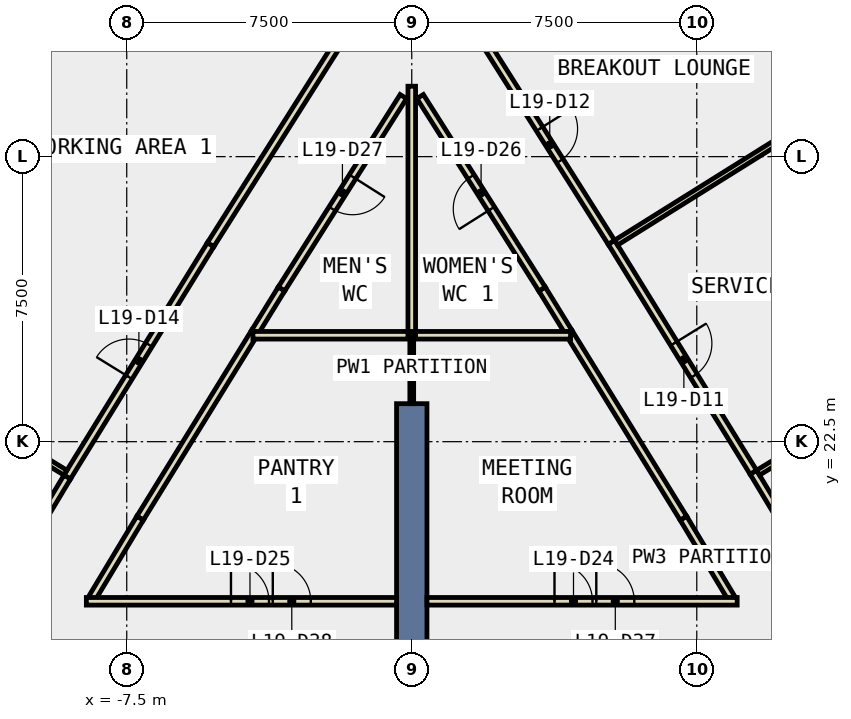
"""IFC4 building model, lengths in metres.
Left out: names, types, materials, properties, quantities, classifications, styles, units other than length and angle.
Written with IfcOpenShell. Run it as: python <this file> out.ifc"""

import sys

from ifc_helpers import new_model, si_unit, direction, frame, frame_2d, origin, place, context, subcontext, project, spatial, rectangle, extrude, element, fill, save


model = new_model("IFC4")
c1 = context("Model", 3, precision=1e-05, world=origin(), true_north=direction((0.0, 1.0)))
c2 = subcontext(c1, "Body", "Model", "MODEL_VIEW")
j1 = project(units=[si_unit("LENGTHUNIT", "METRE"), si_unit("PLANEANGLEUNIT", "RADIAN")], contexts=[c1])
p1 = place(None, origin())
s1 = spatial("IfcSite", under=j1, at=p1, CompositionType="ELEMENT")
p2 = place(p1, origin())
s2 = spatial("IfcBuilding", under=s1, at=p2, CompositionType="ELEMENT")
p3 = place(p2, frame((0.0, 0.0, 90.8)))
s3 = spatial("IfcBuildingStorey", under=s2, at=p3, CompositionType="ELEMENT", Elevation=90.8)
p4 = place(p3, frame((0.0, 14.5, -0.4), z_axis=(0.0, 0.0, 1.0), x_axis=(0.0, 1.0, 0.0)))
e1 = element("IfcWall", 1, at=p4, inside=s3, PredefinedType="SHEAR", context=c2, shape_type="SweptSolid", body=[
    extrude(rectangle(XDim=9.0, YDim=0.8, at=frame_2d((4.5, 0.0))), origin(), (0.0, 0.0, 1.0), 4.2),
])
p5 = place(p3, frame((11.232, 32.043, 0.0), z_axis=(0.0, 0.0, 1.0), x_axis=(-0.534869492536, 0.84493468739, 0.0)))
e2 = element("IfcWall", 2, at=p5, inside=s3, PredefinedType="STANDARD", context=c2, shape_type="SweptSolid", body=[
    extrude(rectangle(XDim=6.076, YDim=0.3, at=frame_2d((3.038, 0.0))), origin(), (0.0, 0.0, 1.0), 3.8),
])
p6 = place(p5, frame((0.519, 0.0, 0.9)))
e3 = element("IfcOpeningElement", 3, at=p6, cuts=e2, PredefinedType="OPENING", context=c2, shape_type="SweptSolid", body=[
    extrude(rectangle(XDim=2.0, YDim=2.6, at=frame_2d((1.0, 1.3))), frame((0.0, 0.16, 0.0), z_axis=(0.0, -1.0, 0.0), x_axis=(1.0, 0.0, 0.0)), (0.0, 0.0, 1.0), 0.32),
])
p7 = place(p5, frame((3.557, 0.0, 0.9)))
e4 = element("IfcOpeningElement", 4, at=p7, cuts=e2, PredefinedType="OPENING", context=c2, shape_type="SweptSolid", body=[
    extrude(rectangle(XDim=2.0, YDim=2.6, at=frame_2d((1.0, 1.3))), frame((0.0, 0.16, 0.0), z_axis=(0.0, -1.0, 0.0), x_axis=(1.0, 0.0, 0.0)), (0.0, 0.0, 1.0), 0.32),
])
p8 = place(p3, frame((-7.982, 37.177, 0.0), z_axis=(0.0, 0.0, 1.0), x_axis=(-0.534869492536, -0.84493468739, 0.0)))
e5 = element("IfcWall", 5, at=p8, inside=s3, PredefinedType="STANDARD", context=c2, shape_type="SweptSolid", body=[
    extrude(rectangle(XDim=6.076, YDim=0.3, at=frame_2d((3.038, 0.0))), origin(), (0.0, 0.0, 1.0), 3.8),
])
p9 = place(p8, frame((0.519, 0.0, 0.9)))
e6 = element("IfcOpeningElement", 6, at=p9, cuts=e5, PredefinedType="OPENING", context=c2, shape_type="SweptSolid", body=[
    extrude(rectangle(XDim=2.0, YDim=2.6, at=frame_2d((1.0, 1.3))), frame((0.0, 0.16, 0.0), z_axis=(0.0, -1.0, 0.0), x_axis=(1.0, 0.0, 0.0)), (0.0, 0.0, 1.0), 0.32),
])
p10 = place(p8, frame((3.557, 0.0, 0.9)))
e7 = element("IfcOpeningElement", 7, at=p10, cuts=e5, PredefinedType="OPENING", context=c2, shape_type="SweptSolid", body=[
    extrude(rectangle(XDim=2.0, YDim=2.6, at=frame_2d((1.0, 1.3))), frame((0.0, 0.16, 0.0), z_axis=(0.0, -1.0, 0.0), x_axis=(1.0, 0.0, 0.0)), (0.0, 0.0, 1.0), 0.32),
])
p11 = place(p3, frame((8.411, 18.386, 0.0), z_axis=(0.0, 0.0, 1.0), x_axis=(-0.515008089027, 0.857185317325, 0.0)))
e8 = element("IfcWall", 8, at=p11, inside=s3, PredefinedType="PARTITIONING", context=c2, shape_type="SweptSolid", body=[
    extrude(rectangle(XDim=2.452, YDim=0.2, at=frame_2d((1.226, 0.0))), origin(), (0.0, 0.0, 1.0), 3.8),
])
for number, where, z_axis, x_axis in (
    (9, (7.148, 20.488, 0.0), (0.0, 0.0, 1.0), (-0.525, 0.851, 0.0)),
    (10, (-4.126, 25.385, 0.0), (0.0, 0.0, 1.0), (-0.525, -0.851, 0.0)),
):
    element("IfcWall", number, at=place(p3, frame(where, z_axis=z_axis, x_axis=x_axis)), inside=s3, PredefinedType="PARTITIONING", context=c2, shape_type="SweptSolid", body=[
        extrude(rectangle(XDim=5.754, YDim=0.2, at=frame_2d((2.877, 0.0))), origin(), (0.0, 0.0, 1.0), 3.8),
    ])
p12 = place(p3, frame((-7.148, 20.488, 0.0), z_axis=(0.0, 0.0, 1.0), x_axis=(-0.515008089027, -0.857185317325, 0.0)))
e11 = element("IfcWall", 11, at=p12, inside=s3, PredefinedType="PARTITIONING", context=c2, shape_type="SweptSolid", body=[
    extrude(rectangle(XDim=2.452, YDim=0.2, at=frame_2d((1.226, 0.0))), origin(), (0.0, 0.0, 1.0), 3.8),
])
p13 = place(p3, frame((4.126, 25.385, 0.0), z_axis=(0.0, 0.0, 1.0), x_axis=(-0.524824420869, 0.851210507019, 0.0)))
e12 = element("IfcWall", 12, at=p13, inside=s3, PredefinedType="PARTITIONING", context=c2, shape_type="SweptSolid", body=[
    extrude(rectangle(XDim=1.33, YDim=0.2, at=frame_2d((0.665, 0.0))), origin(), (0.0, 0.0, 1.0), 3.8),
])
p14 = place(p3, frame((3.428, 26.517, 0.0), z_axis=(0.0, 0.0, 1.0), x_axis=(-0.535034639024, 0.844830122003, 0.0)))
e13 = element("IfcWall", 13, at=p14, inside=s3, PredefinedType="PARTITIONING", context=c2, shape_type="SweptSolid", body=[
    extrude(rectangle(XDim=5.994, YDim=0.2, at=frame_2d((2.997, 0.0))), origin(), (0.0, 0.0, 1.0), 3.8),
])
p15 = place(p14, frame((2.497, 0.0, 0.0)))
e14 = element("IfcOpeningElement", 14, at=p15, cuts=e13, PredefinedType="OPENING", context=c2, shape_type="SweptSolid", body=[
    extrude(rectangle(XDim=1.0, YDim=2.1, at=frame_2d((0.5, 1.05))), frame((0.0, 0.11, 0.0), z_axis=(0.0, -1.0, 0.0), x_axis=(1.0, 0.0, 0.0)), (0.0, 0.0, 1.0), 0.22),
])
p16 = place(p3, frame((-0.221, 31.581, 0.0), z_axis=(0.0, 0.0, 1.0), x_axis=(-0.535034639024, -0.844830122003, 0.0)))
e15 = element("IfcWall", 15, at=p16, inside=s3, PredefinedType="PARTITIONING", context=c2, shape_type="SweptSolid", body=[
    extrude(rectangle(XDim=5.994, YDim=0.2, at=frame_2d((2.997, 0.0))), origin(), (0.0, 0.0, 1.0), 3.8),
])
p17 = place(p16, frame((2.497, 0.0, 0.0)))
e16 = element("IfcOpeningElement", 16, at=p17, cuts=e15, PredefinedType="OPENING", context=c2, shape_type="SweptSolid", body=[
    extrude(rectangle(XDim=1.0, YDim=2.1, at=frame_2d((0.5, 1.05))), frame((0.0, 0.11, 0.0), z_axis=(0.0, -1.0, 0.0), x_axis=(1.0, 0.0, 0.0)), (0.0, 0.0, 1.0), 0.22),
])
p18 = place(p3, frame((-3.428, 26.517, 0.0), z_axis=(0.0, 0.0, 1.0), x_axis=(-0.524824420869, -0.851210507019, 0.0)))
e17 = element("IfcWall", 17, at=p18, inside=s3, PredefinedType="PARTITIONING", context=c2, shape_type="SweptSolid", body=[
    extrude(rectangle(XDim=1.33, YDim=0.2, at=frame_2d((0.665, 0.0))), origin(), (0.0, 0.0, 1.0), 3.8),
])
p19 = place(p3, frame((8.989, 21.696, 0.0), z_axis=(0.0, 0.0, 1.0), x_axis=(0.515000602442, -0.857189815318, 0.0)))
e18 = element("IfcWall", 18, at=p19, inside=s3, PredefinedType="PARTITIONING", context=c2, shape_type="SweptSolid", body=[
    extrude(rectangle(XDim=7.11, YDim=0.2, at=frame_2d((3.555, 0.0))), origin(), (0.0, 0.0, 1.0), 3.8),
])
p20 = place(p19, frame((3.13, 0.0, 0.0)))
e19 = element("IfcOpeningElement", 19, at=p20, cuts=e18, PredefinedType="OPENING", context=c2, shape_type="SweptSolid", body=[
    extrude(rectangle(XDim=1.0, YDim=2.1, at=frame_2d((0.5, 1.05))), frame((0.0, 0.11, 0.0), z_axis=(0.0, -1.0, 0.0), x_axis=(1.0, 0.0, 0.0)), (0.0, 0.0, 1.0), 0.22),
])
p21 = place(p3, frame((5.254, 27.747, 0.0), z_axis=(0.0, 0.0, 1.0), x_axis=(0.52516023635, -0.851003364363, 0.0)))
e20 = element("IfcWall", 20, at=p21, inside=s3, PredefinedType="PARTITIONING", context=c2, shape_type="SweptSolid", body=[
    extrude(rectangle(XDim=7.11, YDim=0.2, at=frame_2d((3.555, 0.0))), origin(), (0.0, 0.0, 1.0), 3.8),
])
p22 = place(p21, frame((3.13, 0.0, 0.0)))
e21 = element("IfcOpeningElement", 21, at=p22, cuts=e20, PredefinedType="OPENING", context=c2, shape_type="SweptSolid", body=[
    extrude(rectangle(XDim=1.0, YDim=2.1, at=frame_2d((0.5, 1.05))), frame((0.0, 0.11, 0.0), z_axis=(0.0, -1.0, 0.0), x_axis=(1.0, 0.0, 0.0)), (0.0, 0.0, 1.0), 0.22),
])
p23 = place(p3, frame((1.929, 32.997, 0.0), z_axis=(0.0, 0.0, 1.0), x_axis=(0.534863276222, -0.844938622474, 0.0)))
e22 = element("IfcWall", 22, at=p23, inside=s3, PredefinedType="PARTITIONING", context=c2, shape_type="SweptSolid", body=[
    extrude(rectangle(XDim=6.215, YDim=0.2, at=frame_2d((3.107, 0.0))), origin(), (0.0, 0.0, 1.0), 3.8),
])
p24 = place(p23, frame((2.682, 0.0, 0.0)))
e23 = element("IfcOpeningElement", 23, at=p24, cuts=e22, PredefinedType="OPENING", context=c2, shape_type="SweptSolid", body=[
    extrude(rectangle(XDim=1.0, YDim=2.1, at=frame_2d((0.5, 1.05))), frame((0.0, 0.11, 0.0), z_axis=(0.0, -1.0, 0.0), x_axis=(1.0, 0.0, 0.0)), (0.0, 0.0, 1.0), 0.22),
])
p25 = place(p3, frame((-9.067, 21.568, 0.0), z_axis=(0.0, 0.0, 1.0), x_axis=(0.525131931126, 0.851020831068, 0.0)))
e24 = element("IfcWall", 24, at=p25, inside=s3, PredefinedType="PARTITIONING", context=c2, shape_type="SweptSolid", body=[
    extrude(rectangle(XDim=7.187, YDim=0.2, at=frame_2d((3.593, 0.0))), origin(), (0.0, 0.0, 1.0), 3.8),
])
p26 = place(p25, frame((3.093, 0.0, 0.0)))
e25 = element("IfcOpeningElement", 25, at=p26, cuts=e24, PredefinedType="OPENING", context=c2, shape_type="SweptSolid", body=[
    extrude(rectangle(XDim=1.0, YDim=2.1, at=frame_2d((0.5, 1.05))), frame((0.0, 0.11, 0.0), z_axis=(0.0, -1.0, 0.0), x_axis=(1.0, 0.0, 0.0)), (0.0, 0.0, 1.0), 0.22),
])
p27 = place(p3, frame((-5.293, 27.684, 0.0), z_axis=(0.0, 0.0, 1.0), x_axis=(0.534952324147, 0.844882246759, 0.0)))
e26 = element("IfcWall", 26, at=p27, inside=s3, PredefinedType="PARTITIONING", context=c2, shape_type="SweptSolid", body=[
    extrude(rectangle(XDim=6.288, YDim=0.2, at=frame_2d((3.144, 0.0))), origin(), (0.0, 0.0, 1.0), 3.8),
])
p28 = place(p3, frame((-12.728, 15.473, 0.0), z_axis=(0.0, 0.0, 1.0), x_axis=(0.515010673306, 0.857183764651, 0.0)))
e27 = element("IfcWall", 27, at=p28, inside=s3, PredefinedType="PARTITIONING", context=c2, shape_type="SweptSolid", body=[
    extrude(rectangle(XDim=7.111, YDim=0.2, at=frame_2d((3.555, 0.0))), origin(), (0.0, 0.0, 1.0), 3.8),
])
p29 = place(p28, frame((3.13, 0.0, 0.0)))
e28 = element("IfcOpeningElement", 28, at=p29, cuts=e27, PredefinedType="OPENING", context=c2, shape_type="SweptSolid", body=[
    extrude(rectangle(XDim=1.0, YDim=2.1, at=frame_2d((0.5, 1.05))), frame((0.0, 0.11, 0.0), z_axis=(0.0, -1.0, 0.0), x_axis=(1.0, 0.0, 0.0)), (0.0, 0.0, 1.0), 0.22),
])
p30 = place(p3, frame((0.4, 18.3, 0.0), z_axis=(0.0, 0.0, 1.0), x_axis=(1.0, 0.0, 0.0)))
e29 = element("IfcWall", 29, at=p30, inside=s3, PredefinedType="PARTITIONING", context=c2, shape_type="SweptSolid", body=[
    extrude(rectangle(XDim=8.163, YDim=0.2, at=frame_2d((4.082, 0.0))), origin(), (0.0, 0.0, 1.0), 3.8),
])
p31 = place(p30, frame((3.356, 0.0, 0.0)))
e30 = element("IfcOpeningElement", 30, at=p31, cuts=e29, PredefinedType="OPENING", context=c2, shape_type="SweptSolid", body=[
    extrude(rectangle(XDim=1.0, YDim=2.1, at=frame_2d((0.5, 1.05))), frame((0.0, 0.11, 0.0), z_axis=(0.0, -1.0, 0.0), x_axis=(1.0, 0.0, 0.0)), (0.0, 0.0, 1.0), 0.22),
])
p32 = place(p30, frame((4.456, 0.0, 0.0)))
e31 = element("IfcOpeningElement", 31, at=p32, cuts=e29, PredefinedType="OPENING", context=c2, shape_type="SweptSolid", body=[
    extrude(rectangle(XDim=1.0, YDim=2.1, at=frame_2d((0.5, 1.05))), frame((0.0, 0.11, 0.0), z_axis=(0.0, -1.0, 0.0), x_axis=(1.0, 0.0, 0.0)), (0.0, 0.0, 1.0), 0.22),
])
p33 = place(p3, frame((-8.563, 18.3, 0.0), z_axis=(0.0, 0.0, 1.0), x_axis=(1.0, 0.0, 0.0)))
e32 = element("IfcWall", 32, at=p33, inside=s3, PredefinedType="PARTITIONING", context=c2, shape_type="SweptSolid", body=[
    extrude(rectangle(XDim=8.163, YDim=0.2, at=frame_2d((4.082, 0.0))), origin(), (0.0, 0.0, 1.0), 3.8),
])
p34 = place(p33, frame((3.806, 0.0, 0.0)))
e33 = element("IfcOpeningElement", 33, at=p34, cuts=e32, PredefinedType="OPENING", context=c2, shape_type="SweptSolid", body=[
    extrude(rectangle(XDim=1.0, YDim=2.1, at=frame_2d((0.5, 1.05))), frame((0.0, 0.11, 0.0), z_axis=(0.0, -1.0, 0.0), x_axis=(1.0, 0.0, 0.0)), (0.0, 0.0, 1.0), 0.22),
])
p35 = place(p33, frame((4.906, 0.0, 0.0)))
e34 = element("IfcOpeningElement", 34, at=p35, cuts=e32, PredefinedType="OPENING", context=c2, shape_type="SweptSolid", body=[
    extrude(rectangle(XDim=1.0, YDim=2.1, at=frame_2d((0.5, 1.05))), frame((0.0, 0.11, 0.0), z_axis=(0.0, -1.0, 0.0), x_axis=(1.0, 0.0, 0.0)), (0.0, 0.0, 1.0), 0.22),
])
p36 = place(p3, frame((0.0, 23.5, 0.0), z_axis=(0.0, 0.0, 1.0), x_axis=(0.0, 1.0, 0.0)))
e35 = element("IfcWall", 35, at=p36, inside=s3, PredefinedType="PARTITIONING", context=c2, shape_type="SweptSolid", body=[
    extrude(rectangle(XDim=1.9, YDim=0.1, at=frame_2d((0.95, 0.0))), origin(), (0.0, 0.0, 1.0), 3.8),
])
for number, where, z_axis, x_axis in (
    (36, (0.1, 25.3, 0.0), (0.0, 0.0, 1.0), (1.0, 0.0, 0.0)),
    (37, (-4.179, 25.3, 0.0), (0.0, 0.0, 1.0), (1.0, 0.0, 0.0)),
):
    element("IfcWall", number, at=place(p3, frame(where, z_axis=z_axis, x_axis=x_axis)), inside=s3, PredefinedType="PARTITIONING", context=c2, shape_type="SweptSolid", body=[
        extrude(rectangle(XDim=4.079, YDim=0.2, at=frame_2d((2.04, 0.0))), origin(), (0.0, 0.0, 1.0), 3.8),
    ])
p37 = place(p3, frame((0.0, 25.4, 0.0), z_axis=(0.0, 0.0, 1.0), x_axis=(0.0, 1.0, 0.0)))
e38 = element("IfcWall", 38, at=p37, inside=s3, PredefinedType="PARTITIONING", context=c2, shape_type="SweptSolid", body=[
    extrude(rectangle(XDim=6.453, YDim=0.2, at=frame_2d((3.227, 0.0))), origin(), (0.0, 0.0, 1.0), 3.8),
])
p38 = place(p3, frame((9.113, 21.684, 0.0), z_axis=(0.0, 0.0, 1.0), x_axis=(0.854075097122, 0.520149717367, 0.0)))
e39 = element("IfcWall", 39, at=p38, inside=s3, PredefinedType="PARTITIONING", context=c2, shape_type="SweptSolid", body=[
    extrude(rectangle(XDim=5.729, YDim=0.15, at=frame_2d((2.865, 0.0))), origin(), (0.0, 0.0, 1.0), 3.8),
])
p39 = place(p3, frame((5.378, 27.737, 0.0), z_axis=(0.0, 0.0, 1.0), x_axis=(0.848005484868, 0.529987450449, 0.0)))
e40 = element("IfcWall", 40, at=p39, inside=s3, PredefinedType="PARTITIONING", context=c2, shape_type="SweptSolid", body=[
    extrude(rectangle(XDim=5.73, YDim=0.15, at=frame_2d((2.865, 0.0))), origin(), (0.0, 0.0, 1.0), 3.8),
])
p40 = place(p3, frame((-9.113, 21.684, 0.0), z_axis=(0.0, 0.0, 1.0), x_axis=(-0.854075097122, 0.520149717367, 0.0)))
e41 = element("IfcWall", 41, at=p40, inside=s3, PredefinedType="PARTITIONING", context=c2, shape_type="SweptSolid", body=[
    extrude(rectangle(XDim=5.729, YDim=0.15, at=frame_2d((2.865, 0.0))), origin(), (0.0, 0.0, 1.0), 3.8),
])
p41 = place(p22, origin())
e42 = element("IfcDoor", 42, at=p41, inside=s3, OperationType="SINGLE_SWING_LEFT", PredefinedType="DOOR", context=c2, shape_type="SweptSolid", body=[
    extrude(rectangle(XDim=1.0, YDim=2.1, at=frame_2d((0.5, 1.05))), frame((0.0, 0.025, 0.0), z_axis=(0.0, -1.0, 0.0), x_axis=(1.0, 0.0, 0.0)), (0.0, 0.0, 1.0), 0.05),
])
fill(e21, e42)
p42 = place(p24, origin())
e43 = element("IfcDoor", 43, at=p42, inside=s3, OperationType="SINGLE_SWING_LEFT", PredefinedType="DOOR", context=c2, shape_type="SweptSolid", body=[
    extrude(rectangle(XDim=1.0, YDim=2.1, at=frame_2d((0.5, 1.05))), frame((0.0, 0.025, 0.0), z_axis=(0.0, -1.0, 0.0), x_axis=(1.0, 0.0, 0.0)), (0.0, 0.0, 1.0), 0.05),
])
fill(e23, e43)
p43 = place(p26, origin())
e44 = element("IfcDoor", 44, at=p43, inside=s3, OperationType="SINGLE_SWING_RIGHT", PredefinedType="DOOR", context=c2, shape_type="SweptSolid", body=[
    extrude(rectangle(XDim=1.0, YDim=2.1, at=frame_2d((0.5, 1.05))), frame((0.0, 0.025, 0.0), z_axis=(0.0, -1.0, 0.0), x_axis=(1.0, 0.0, 0.0)), (0.0, 0.0, 1.0), 0.05),
])
fill(e25, e44)
p44 = place(p31, origin())
e45 = element("IfcDoor", 45, at=p44, inside=s3, OperationType="SINGLE_SWING_RIGHT", PredefinedType="DOOR", context=c2, shape_type="SweptSolid", body=[
    extrude(rectangle(XDim=1.0, YDim=2.1, at=frame_2d((0.5, 1.05))), frame((0.0, 0.025, 0.0), z_axis=(0.0, -1.0, 0.0), x_axis=(1.0, 0.0, 0.0)), (0.0, 0.0, 1.0), 0.05),
])
fill(e30, e45)
p45 = place(p34, origin())
e46 = element("IfcDoor", 46, at=p45, inside=s3, OperationType="SINGLE_SWING_RIGHT", PredefinedType="DOOR", context=c2, shape_type="SweptSolid", body=[
    extrude(rectangle(XDim=1.0, YDim=2.1, at=frame_2d((0.5, 1.05))), frame((0.0, 0.025, 0.0), z_axis=(0.0, -1.0, 0.0), x_axis=(1.0, 0.0, 0.0)), (0.0, 0.0, 1.0), 0.05),
])
fill(e33, e46)
p46 = place(p15, origin())
e47 = element("IfcDoor", 47, at=p46, inside=s3, OperationType="SINGLE_SWING_LEFT", PredefinedType="DOOR", context=c2, shape_type="SweptSolid", body=[
    extrude(rectangle(XDim=1.0, YDim=2.1, at=frame_2d((0.5, 1.05))), frame((0.0, 0.025, 0.0), z_axis=(0.0, -1.0, 0.0), x_axis=(1.0, 0.0, 0.0)), (0.0, 0.0, 1.0), 0.05),
])
fill(e14, e47)
p47 = place(p17, origin())
e48 = element("IfcDoor", 48, at=p47, inside=s3, OperationType="SINGLE_SWING_LEFT", PredefinedType="DOOR", context=c2, shape_type="SweptSolid", body=[
    extrude(rectangle(XDim=1.0, YDim=2.1, at=frame_2d((0.5, 1.05))), frame((0.0, 0.025, 0.0), z_axis=(0.0, -1.0, 0.0), x_axis=(1.0, 0.0, 0.0)), (0.0, 0.0, 1.0), 0.05),
])
fill(e16, e48)
p48 = place(p32, origin())
e49 = element("IfcDoor", 49, at=p48, inside=s3, OperationType="SINGLE_SWING_RIGHT", PredefinedType="DOOR", context=c2, shape_type="SweptSolid", body=[
    extrude(rectangle(XDim=1.0, YDim=2.1, at=frame_2d((0.5, 1.05))), frame((0.0, 0.025, 0.0), z_axis=(0.0, -1.0, 0.0), x_axis=(1.0, 0.0, 0.0)), (0.0, 0.0, 1.0), 0.05),
])
fill(e31, e49)
p49 = place(p35, origin())
e50 = element("IfcDoor", 50, at=p49, inside=s3, OperationType="SINGLE_SWING_RIGHT", PredefinedType="DOOR", context=c2, shape_type="SweptSolid", body=[
    extrude(rectangle(XDim=1.0, YDim=2.1, at=frame_2d((0.5, 1.05))), frame((0.0, 0.025, 0.0), z_axis=(0.0, -1.0, 0.0), x_axis=(1.0, 0.0, 0.0)), (0.0, 0.0, 1.0), 0.05),
])
fill(e34, e50)
save(model, sys.argv[1])
